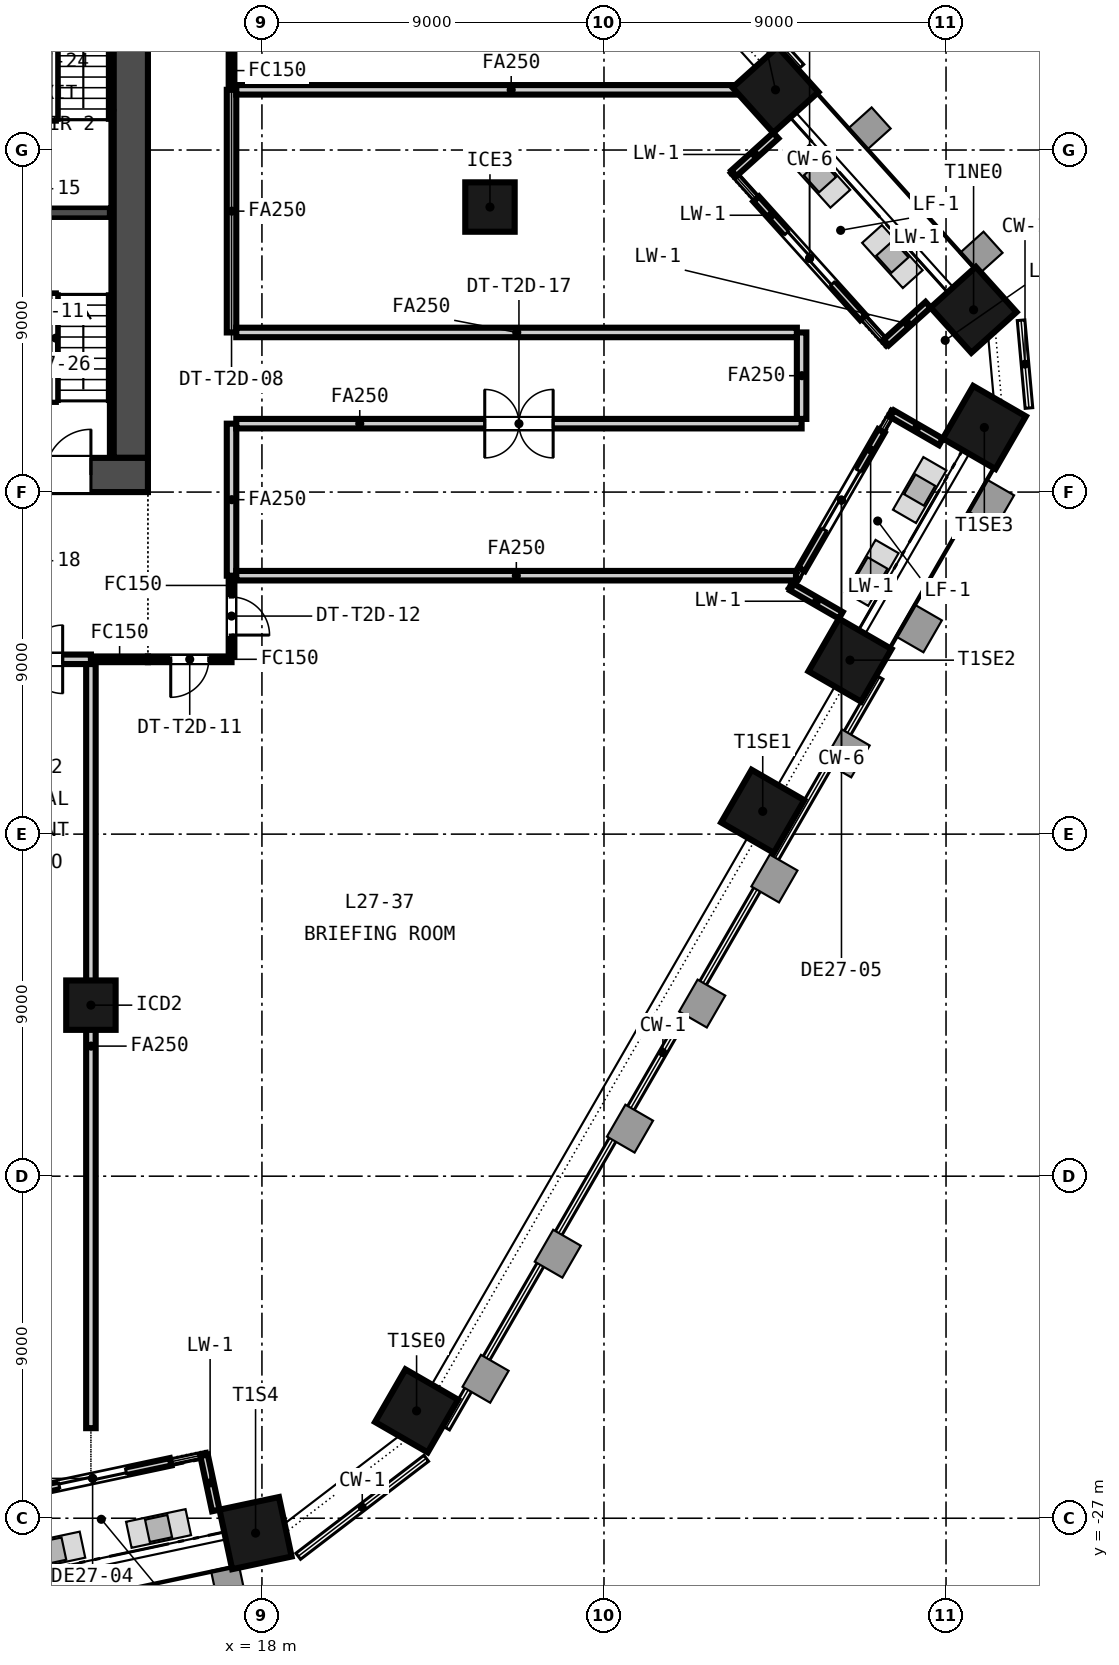
"""IFC4 building model, lengths in metres.
Left out: names, types, materials, properties, quantities, classifications, styles, units other than length and angle.
Written with IfcOpenShell. Run it as: python <this file> out.ifc"""

import sys

from ifc_helpers import new_model, si_unit, direction, frame, frame_2d, origin, origin_2d, place, context, subcontext, project, spatial, rectangle, extrude, element, fill, save


model = new_model("IFC4")
c1 = context("Model", 3, precision=1e-05, world=origin(), true_north=direction((0.0, 1.0)))
c2 = subcontext(c1, "Body", "Model", "MODEL_VIEW")
j1 = project(units=[si_unit("LENGTHUNIT", "METRE"), si_unit("PLANEANGLEUNIT", "RADIAN")], contexts=[c1])
p1 = place(None, origin())
s1 = spatial("IfcSite", under=j1, at=p1, CompositionType="ELEMENT")
p2 = place(p1, origin())
s2 = spatial("IfcBuilding", under=s1, at=p2, CompositionType="ELEMENT")
p3 = place(p2, frame((0.0, 0.0, 113.5)))
s3 = spatial("IfcBuildingStorey", under=s2, at=p3, CompositionType="ELEMENT", Elevation=113.5)
p4 = place(p3, frame((-15.0, 0.45, -0.15), z_axis=(0.0, 0.0, 1.0), x_axis=(1.0, 0.0, 0.0)))
e1 = element("IfcWall", 1, at=p4, inside=s3, PredefinedType="SOLIDWALL", context=c2, shape_type="SweptSolid", body=[
    extrude(rectangle(XDim=30.0, YDim=0.9, at=frame_2d((15.0, 0.0))), origin(), (0.0, 0.0, 1.0), 3.5),
])
p5 = place(p4, frame((5.8, 0.0, 0.15)))
e2 = element("IfcOpeningElement", 2, at=p5, cuts=e1, PredefinedType="OPENING", context=c2, shape_type="SweptSolid", body=[
    extrude(rectangle(XDim=2.4, YDim=2.4, at=frame_2d((1.2, 1.2))), frame((0.0, 0.46, 0.0), z_axis=(0.0, -1.0, 0.0), x_axis=(1.0, 0.0, 0.0)), (0.0, 0.0, 1.0), 0.92),
])
p6 = place(p4, frame((13.8, 0.0, 0.15)))
e3 = element("IfcOpeningElement", 3, at=p6, cuts=e1, PredefinedType="OPENING", context=c2, shape_type="SweptSolid", body=[
    extrude(rectangle(XDim=2.4, YDim=2.4, at=frame_2d((1.2, 1.2))), frame((0.0, 0.46, 0.0), z_axis=(0.0, -1.0, 0.0), x_axis=(1.0, 0.0, 0.0)), (0.0, 0.0, 1.0), 0.92),
])
p7 = place(p4, frame((21.8, 0.0, 0.15)))
e4 = element("IfcOpeningElement", 4, at=p7, cuts=e1, PredefinedType="OPENING", context=c2, shape_type="SweptSolid", body=[
    extrude(rectangle(XDim=2.4, YDim=2.4, at=frame_2d((1.2, 1.2))), frame((0.0, 0.46, 0.0), z_axis=(0.0, -1.0, 0.0), x_axis=(1.0, 0.0, 0.0)), (0.0, 0.0, 1.0), 0.92),
])
p8 = place(p4, frame((1.5, 0.0, 0.15)))
e5 = element("IfcOpeningElement", 5, at=p8, cuts=e1, PredefinedType="OPENING", context=c2, shape_type="SweptSolid", body=[
    extrude(rectangle(XDim=1.2, YDim=2.1, at=frame_2d((0.6, 1.05))), frame((0.0, 0.46, 0.0), z_axis=(0.0, -1.0, 0.0), x_axis=(1.0, 0.0, 0.0)), (0.0, 0.0, 1.0), 0.92),
])
p9 = place(p4, frame((27.3, 0.0, 0.15)))
e6 = element("IfcOpeningElement", 6, at=p9, cuts=e1, PredefinedType="OPENING", context=c2, shape_type="SweptSolid", body=[
    extrude(rectangle(XDim=1.2, YDim=2.1, at=frame_2d((0.6, 1.05))), frame((0.0, 0.46, 0.0), z_axis=(0.0, -1.0, 0.0), x_axis=(1.0, 0.0, 0.0)), (0.0, 0.0, 1.0), 0.92),
])
p10 = place(p3, frame((14.55, 0.9, -0.15), z_axis=(0.0, 0.0, 1.0), x_axis=(0.0, 1.0, 0.0)))
e7 = element("IfcWall", 7, at=p10, inside=s3, PredefinedType="SOLIDWALL", context=c2, shape_type="SweptSolid", body=[
    extrude(rectangle(XDim=13.2, YDim=0.9, at=frame_2d((6.6, 0.0))), origin(), (0.0, 0.0, 1.0), 3.5),
])
for number, where, z_axis, x_axis in (
    (8, (17.832, -27.392, -0.15), (0.0, 0.0, 1.0), (0.978, 0.208, 0.0)),
    (9, (22.069, -24.175, -0.15), (0.0, 0.0, 1.0), (0.5, 0.866, 0.0)),
    (10, (31.177, -8.4, -0.15), (0.0, 0.0, 1.0), (0.5, 0.866, 0.0)),
    (11, (33.473, -4.422, -0.15), (0.0, 0.0, 1.0), (0.5, 0.866, 0.0)),
    (12, (37.008, 1.7, -0.15), (0.0, 0.0, 1.0), (0.5, 0.866, 0.0)),
    (13, (36.725, 4.795, -0.15), (0.0, 0.0, 1.0), (-0.669, 0.743, 0.0)),
    (14, (31.513, 10.584, -0.15), (0.0, 0.0, 1.0), (-0.669, 0.743, 0.0)),
):
    element("IfcColumn", number, at=place(p3, frame(where, z_axis=z_axis, x_axis=x_axis)), inside=s3, PredefinedType="COLUMN", context=c2, shape_type="SweptSolid", body=[
        extrude(rectangle(XDim=1.6, YDim=1.6, at=origin_2d()), origin(), (0.0, 0.0, 1.0), 3.5),
    ])
for number, where, z_axis, x_axis in (
    (15, (13.5, -13.5, -0.15), (0.0, 0.0, 1.0), (1.0, 0.0, 0.0)),
    (16, (24.0, 7.5, -0.15), (0.0, 0.0, 1.0), (1.0, 0.0, 0.0)),
):
    element("IfcColumn", number, at=place(p3, frame(where, z_axis=z_axis, x_axis=x_axis)), inside=s3, PredefinedType="COLUMN", context=c2, shape_type="SweptSolid", body=[
        extrude(rectangle(XDim=1.3, YDim=1.3, at=origin_2d()), origin(), (0.0, 0.0, 1.0), 3.5),
    ])
p11 = place(p3, frame((11.49, -26.388, 0.0), z_axis=(0.0, 0.0, 1.0), x_axis=(0.978146440129, 0.207917150959, 0.0)))
e17 = element("IfcWall", 17, at=p11, inside=s3, PredefinedType="SOLIDWALL", context=c2, shape_type="SweptSolid", body=[
    extrude(rectangle(XDim=4.2, YDim=0.2, at=frame_2d((2.1, 0.0))), origin(), (0.0, 0.0, 1.0), 2.591),
])
p12 = place(p11, frame((1.2, 0.0, 0.0)))
e18 = element("IfcOpeningElement", 18, at=p12, cuts=e17, PredefinedType="OPENING", context=c2, shape_type="SweptSolid", body=[
    extrude(rectangle(XDim=1.8, YDim=2.4, at=frame_2d((0.9, 1.2))), frame((0.0, 0.11, 0.0), z_axis=(0.0, -1.0, 0.0), x_axis=(1.0, 0.0, 0.0)), (0.0, 0.0, 1.0), 0.22),
])
p13 = place(p3, frame((16.785, -26.796, 0.0), z_axis=(0.0, 0.0, 1.0), x_axis=(-0.207776118874, 0.978176407621, 0.0)))
e19 = element("IfcWall", 19, at=p13, inside=s3, PredefinedType="SOLIDWALL", context=c2, shape_type="SweptSolid", body=[
    extrude(rectangle(XDim=1.484, YDim=0.2, at=frame_2d((0.742, 0.0))), origin(), (0.0, 0.0, 1.0), 2.826),
])
p14 = place(p3, frame((32.199, -2.03, 0.0), z_axis=(0.0, 0.0, 1.0), x_axis=(0.499958946799, 0.866049104564, 0.0)))
e20 = element("IfcWall", 20, at=p14, inside=s3, PredefinedType="SOLIDWALL", context=c2, shape_type="SweptSolid", body=[
    extrude(rectangle(XDim=4.2, YDim=0.2, at=frame_2d((2.1, 0.0))), origin(), (0.0, 0.0, 1.0), 2.671),
])
p15 = place(p14, frame((1.2, 0.0, 0.0)))
e21 = element("IfcOpeningElement", 21, at=p15, cuts=e20, PredefinedType="OPENING", context=c2, shape_type="SweptSolid", body=[
    extrude(rectangle(XDim=1.8, YDim=2.4, at=frame_2d((0.9, 1.2))), frame((0.0, 0.11, 0.0), z_axis=(0.0, -1.0, 0.0), x_axis=(1.0, 0.0, 0.0)), (0.0, 0.0, 1.0), 0.22),
])
for number, where, z_axis, x_axis in (
    (22, (33.23, -3.243, 0.0), (0.0, 0.0, 1.0), (-0.866, 0.5, 0.0)),
    (23, (35.865, 1.321, 0.0), (0.0, 0.0, 1.0), (-0.866, 0.5, 0.0)),
):
    element("IfcWall", number, at=place(p3, frame(where, z_axis=z_axis, x_axis=x_axis)), inside=s3, PredefinedType="SOLIDWALL", context=c2, shape_type="SweptSolid", body=[
        extrude(rectangle(XDim=1.484, YDim=0.2, at=frame_2d((0.742, 0.0))), origin(), (0.0, 0.0, 1.0), 2.9),
    ])
p16 = place(p3, frame((33.815, 4.59, 0.0), z_axis=(0.0, 0.0, 1.0), x_axis=(-0.669138140895, 0.743138041282, 0.0)))
e24 = element("IfcWall", 24, at=p16, inside=s3, PredefinedType="SOLIDWALL", context=c2, shape_type="SweptSolid", body=[
    extrude(rectangle(XDim=4.2, YDim=0.2, at=frame_2d((2.1, 0.0))), origin(), (0.0, 0.0, 1.0), 2.671),
])
p17 = place(p16, frame((1.2, 0.0, 0.0)))
e25 = element("IfcOpeningElement", 25, at=p17, cuts=e24, PredefinedType="OPENING", context=c2, shape_type="SweptSolid", body=[
    extrude(rectangle(XDim=1.8, YDim=2.4, at=frame_2d((0.9, 1.2))), frame((0.0, 0.11, 0.0), z_axis=(0.0, -1.0, 0.0), x_axis=(1.0, 0.0, 0.0)), (0.0, 0.0, 1.0), 0.22),
])
p18 = place(p3, frame((35.528, 4.929, 0.0), z_axis=(0.0, 0.0, 1.0), x_axis=(-0.743155057383, -0.669119242501, 0.0)))
e26 = element("IfcWall", 26, at=p18, inside=s3, PredefinedType="SOLIDWALL", context=c2, shape_type="SweptSolid", body=[
    extrude(rectangle(XDim=1.484, YDim=0.2, at=frame_2d((0.742, 0.0))), origin(), (0.0, 0.0, 1.0), 2.671),
])
p19 = place(p3, frame((31.521, 9.38, 0.0), z_axis=(0.0, 0.0, 1.0), x_axis=(-0.743073249722, -0.669210090739, 0.0)))
e27 = element("IfcWall", 27, at=p19, inside=s3, PredefinedType="SOLIDWALL", context=c2, shape_type="SweptSolid", body=[
    extrude(rectangle(XDim=1.484, YDim=0.2, at=frame_2d((0.742, 0.0))), origin(), (0.0, 0.0, 1.0), 2.9),
])
p20 = place(p3, frame((11.05, 7.35, 0.0), z_axis=(0.0, 0.0, 1.0), x_axis=(1.0, 0.0, 0.0)))
e28 = element("IfcWall", 28, at=p20, inside=s3, PredefinedType="SOLIDWALL", context=c2, shape_type="SweptSolid", body=[
    extrude(rectangle(XDim=2.95, YDim=0.3, at=frame_2d((1.475, 0.0))), origin(), (0.0, 0.0, 1.0), 3.35),
])
p21 = place(p3, frame((14.05, 0.9, 0.0), z_axis=(0.0, 0.0, 1.0), x_axis=(0.0, 1.0, 0.0)))
e29 = element("IfcWall", 29, at=p21, inside=s3, PredefinedType="SOLIDWALL", context=c2, shape_type="SweptSolid", body=[
    extrude(rectangle(XDim=13.2, YDim=0.1, at=frame_2d((6.6, 0.0))), origin(), (0.0, 0.0, 1.0), 3.35),
])
p22 = place(p3, frame((15.0, -4.4, 0.0), z_axis=(0.0, 0.0, 1.0), x_axis=(-1.0, 0.0, 0.0)))
e30 = element("IfcWall", 30, at=p22, inside=s3, PredefinedType="PARTITIONING", context=c2, shape_type="SweptSolid", body=[
    extrude(rectangle(XDim=1.5, YDim=0.15, at=frame_2d((0.75, 0.0))), origin(), (0.0, 0.0, 1.0), 2.591),
])
p23 = place(p3, frame((13.5, -4.4, 0.0), z_axis=(0.0, 0.0, 1.0), x_axis=(-1.0, 0.0, 0.0)))
e31 = element("IfcWall", 31, at=p23, inside=s3, PredefinedType="PARTITIONING", context=c2, shape_type="SweptSolid", body=[
    extrude(rectangle(XDim=3.287, YDim=0.25, at=frame_2d((1.644, 0.0))), origin(), (0.0, 0.0, 1.0), 2.591),
])
p24 = place(p23, frame((0.743, 0.0, 0.0)))
e32 = element("IfcOpeningElement", 32, at=p24, cuts=e31, PredefinedType="OPENING", context=c2, shape_type="SweptSolid", body=[
    extrude(rectangle(XDim=1.8, YDim=2.1, at=frame_2d((0.9, 1.05))), frame((0.0, 0.135, 0.0), z_axis=(0.0, -1.0, 0.0), x_axis=(1.0, 0.0, 0.0)), (0.0, 0.0, 1.0), 0.27),
])
p25 = place(p3, frame((17.2, 13.709, 0.0), z_axis=(0.0, 0.0, 1.0), x_axis=(0.0, -1.0, 0.0)))
e33 = element("IfcWall", 33, at=p25, inside=s3, PredefinedType="PARTITIONING", context=c2, shape_type="SweptSolid", body=[
    extrude(rectangle(XDim=3.125, YDim=0.15, at=frame_2d((1.562, 0.0))), origin(), (0.0, 0.0, 1.0), 2.591),
])
p26 = place(p25, frame((1.062, 0.0, 0.0)))
e34 = element("IfcOpeningElement", 34, at=p26, cuts=e33, PredefinedType="OPENING", context=c2, shape_type="SweptSolid", body=[
    extrude(rectangle(XDim=1.0, YDim=2.1, at=frame_2d((0.5, 1.05))), frame((0.0, 0.085, 0.0), z_axis=(0.0, -1.0, 0.0), x_axis=(1.0, 0.0, 0.0)), (0.0, 0.0, 1.0), 0.17),
])
p27 = place(p3, frame((17.2, -4.4, 0.0), z_axis=(0.0, 0.0, 1.0), x_axis=(-1.0, 0.0, 0.0)))
e35 = element("IfcWall", 35, at=p27, inside=s3, PredefinedType="PARTITIONING", context=c2, shape_type="SweptSolid", body=[
    extrude(rectangle(XDim=2.2, YDim=0.15, at=frame_2d((1.1, 0.0))), origin(), (0.0, 0.0, 1.0), 2.591),
])
p28 = place(p27, frame((0.6, 0.0, 0.0)))
e36 = element("IfcOpeningElement", 36, at=p28, cuts=e35, PredefinedType="OPENING", context=c2, shape_type="SweptSolid", body=[
    extrude(rectangle(XDim=1.0, YDim=2.1, at=frame_2d((0.5, 1.05))), frame((0.0, 0.085, 0.0), z_axis=(0.0, -1.0, 0.0), x_axis=(1.0, 0.0, 0.0)), (0.0, 0.0, 1.0), 0.17),
])
p29 = place(p3, frame((17.2, -2.2, 0.0), z_axis=(0.0, 0.0, 1.0), x_axis=(0.0, -1.0, 0.0)))
e37 = element("IfcWall", 37, at=p29, inside=s3, PredefinedType="PARTITIONING", context=c2, shape_type="SweptSolid", body=[
    extrude(rectangle(XDim=2.125, YDim=0.15, at=frame_2d((1.062, 0.0))), origin(), (0.0, 0.0, 1.0), 2.591),
])
p30 = place(p29, frame((0.562, 0.0, 0.0)))
e38 = element("IfcOpeningElement", 38, at=p30, cuts=e37, PredefinedType="OPENING", context=c2, shape_type="SweptSolid", body=[
    extrude(rectangle(XDim=1.0, YDim=2.1, at=frame_2d((0.5, 1.05))), frame((0.0, 0.085, 0.0), z_axis=(0.0, -1.0, 0.0), x_axis=(1.0, 0.0, 0.0)), (0.0, 0.0, 1.0), 0.17),
])
p31 = place(p3, frame((17.2, 1.8, 0.0), z_axis=(0.0, 0.0, 1.0), x_axis=(0.0, -1.0, 0.0)))
e39 = element("IfcWall", 39, at=p31, inside=s3, PredefinedType="PARTITIONING", context=c2, shape_type="SweptSolid", body=[
    extrude(rectangle(XDim=4.0, YDim=0.25, at=frame_2d((2.0, 0.0))), origin(), (0.0, 0.0, 1.0), 2.591),
])
p32 = place(p3, frame((32.2, 1.8, 0.0), z_axis=(0.0, 0.0, 1.0), x_axis=(-1.0, 0.0, 0.0)))
e40 = element("IfcWall", 40, at=p32, inside=s3, PredefinedType="PARTITIONING", context=c2, shape_type="SweptSolid", body=[
    extrude(rectangle(XDim=14.875, YDim=0.25, at=frame_2d((7.438, 0.0))), origin(), (0.0, 0.0, 1.0), 2.591),
])
p33 = place(p32, frame((6.538, 0.0, 0.0)))
e41 = element("IfcOpeningElement", 41, at=p33, cuts=e40, PredefinedType="OPENING", context=c2, shape_type="SweptSolid", body=[
    extrude(rectangle(XDim=1.8, YDim=2.1, at=frame_2d((0.9, 1.05))), frame((0.0, 0.135, 0.0), z_axis=(0.0, -1.0, 0.0), x_axis=(1.0, 0.0, 0.0)), (0.0, 0.0, 1.0), 0.27),
])
p34 = place(p3, frame((32.2, 4.2, 0.0), z_axis=(0.0, 0.0, 1.0), x_axis=(0.0, -1.0, 0.0)))
e42 = element("IfcWall", 42, at=p34, inside=s3, PredefinedType="PARTITIONING", context=c2, shape_type="SweptSolid", body=[
    extrude(rectangle(XDim=2.275, YDim=0.25, at=frame_2d((1.137, 0.0))), origin(), (0.0, 0.0, 1.0), 2.591),
])
p35 = place(p3, frame((17.2, 10.584, 0.0), z_axis=(0.0, 0.0, 1.0), x_axis=(0.0, -1.0, 0.0)))
e43 = element("IfcWall", 43, at=p35, inside=s3, PredefinedType="PARTITIONING", context=c2, shape_type="SweptSolid", body=[
    extrude(rectangle(XDim=6.384, YDim=0.25, at=frame_2d((3.192, 0.0))), origin(), (0.0, 0.0, 1.0), 2.591),
])
p36 = place(p3, frame((17.325, 10.584, 0.0), z_axis=(0.0, 0.0, 1.0), x_axis=(1.0, 0.0, 0.0)))
e44 = element("IfcWall", 44, at=p36, inside=s3, PredefinedType="PARTITIONING", context=c2, shape_type="SweptSolid", body=[
    extrude(rectangle(XDim=14.457, YDim=0.25, at=frame_2d((7.229, 0.0))), origin(), (0.0, 0.0, 1.0), 2.591),
])
p37 = place(p3, frame((17.325, 4.2, 0.0), z_axis=(0.0, 0.0, 1.0), x_axis=(1.0, 0.0, 0.0)))
e45 = element("IfcWall", 45, at=p37, inside=s3, PredefinedType="PARTITIONING", context=c2, shape_type="SweptSolid", body=[
    extrude(rectangle(XDim=14.75, YDim=0.25, at=frame_2d((7.375, 0.0))), origin(), (0.0, 0.0, 1.0), 2.591),
])
p38 = place(p3, frame((17.325, -2.2, 0.0), z_axis=(0.0, 0.0, 1.0), x_axis=(1.0, 0.0, 0.0)))
e46 = element("IfcWall", 46, at=p38, inside=s3, PredefinedType="PARTITIONING", context=c2, shape_type="SweptSolid", body=[
    extrude(rectangle(XDim=14.727, YDim=0.25, at=frame_2d((7.364, 0.0))), origin(), (0.0, 0.0, 1.0), 2.591),
])
p39 = place(p3, frame((13.5, -24.63, 0.0), z_axis=(0.0, 0.0, 1.0), x_axis=(0.0, 1.0, 0.0)))
e47 = element("IfcWall", 47, at=p39, inside=s3, PredefinedType="PARTITIONING", context=c2, shape_type="SweptSolid", body=[
    extrude(rectangle(XDim=20.105, YDim=0.25, at=frame_2d((10.053, 0.0))), origin(), (0.0, 0.0, 1.0), 2.591),
])
p40 = place(p12, origin())
e48 = element("IfcDoor", 48, at=p40, inside=s3, OperationType="SINGLE_SWING_LEFT", PredefinedType="DOOR", context=c2, shape_type="SweptSolid", body=[
    extrude(rectangle(XDim=1.8, YDim=2.4, at=frame_2d((0.9, 1.2))), frame((0.0, 0.025, 0.0), z_axis=(0.0, -1.0, 0.0), x_axis=(1.0, 0.0, 0.0)), (0.0, 0.0, 1.0), 0.05),
])
fill(e18, e48)
p41 = place(p15, origin())
e49 = element("IfcDoor", 49, at=p41, inside=s3, OperationType="SINGLE_SWING_LEFT", PredefinedType="DOOR", context=c2, shape_type="SweptSolid", body=[
    extrude(rectangle(XDim=1.8, YDim=2.4, at=frame_2d((0.9, 1.2))), frame((0.0, 0.025, 0.0), z_axis=(0.0, -1.0, 0.0), x_axis=(1.0, 0.0, 0.0)), (0.0, 0.0, 1.0), 0.05),
])
fill(e21, e49)
p42 = place(p17, origin())
e50 = element("IfcDoor", 50, at=p42, inside=s3, OperationType="SINGLE_SWING_LEFT", PredefinedType="DOOR", context=c2, shape_type="SweptSolid", body=[
    extrude(rectangle(XDim=1.8, YDim=2.4, at=frame_2d((0.9, 1.2))), frame((0.0, 0.025, 0.0), z_axis=(0.0, -1.0, 0.0), x_axis=(1.0, 0.0, 0.0)), (0.0, 0.0, 1.0), 0.05),
])
fill(e25, e50)
p43 = place(p9, origin())
e51 = element("IfcDoor", 51, at=p43, inside=s3, OperationType="SINGLE_SWING_RIGHT", PredefinedType="DOOR", context=c2, shape_type="SweptSolid", body=[
    extrude(rectangle(XDim=1.2, YDim=2.1, at=frame_2d((0.6, 1.05))), frame((0.0, 0.025, 0.0), z_axis=(0.0, -1.0, 0.0), x_axis=(1.0, 0.0, 0.0)), (0.0, 0.0, 1.0), 0.05),
])
fill(e6, e51)
p44 = place(p28, origin())
e52 = element("IfcDoor", 52, at=p44, inside=s3, OperationType="SINGLE_SWING_RIGHT", PredefinedType="DOOR", context=c2, shape_type="SweptSolid", body=[
    extrude(rectangle(XDim=1.0, YDim=2.1, at=frame_2d((0.5, 1.05))), frame((0.0, 0.025, 0.0), z_axis=(0.0, -1.0, 0.0), x_axis=(1.0, 0.0, 0.0)), (0.0, 0.0, 1.0), 0.05),
])
fill(e36, e52)
p45 = place(p30, origin())
e53 = element("IfcDoor", 53, at=p45, inside=s3, OperationType="SINGLE_SWING_RIGHT", PredefinedType="DOOR", context=c2, shape_type="SweptSolid", body=[
    extrude(rectangle(XDim=1.0, YDim=2.1, at=frame_2d((0.5, 1.05))), frame((0.0, 0.025, 0.0), z_axis=(0.0, -1.0, 0.0), x_axis=(1.0, 0.0, 0.0)), (0.0, 0.0, 1.0), 0.05),
])
fill(e38, e53)
p46 = place(p33, origin())
e54 = element("IfcDoor", 54, at=p46, inside=s3, OperationType="DOUBLE_DOOR_DOUBLE_SWING", PredefinedType="DOOR", context=c2, shape_type="SweptSolid", body=[
    extrude(rectangle(XDim=1.8, YDim=2.1, at=frame_2d((0.9, 1.05))), frame((0.0, 0.025, 0.0), z_axis=(0.0, -1.0, 0.0), x_axis=(1.0, 0.0, 0.0)), (0.0, 0.0, 1.0), 0.05),
])
fill(e41, e54)
p47 = place(p24, origin())
e55 = element("IfcDoor", 55, at=p47, inside=s3, OperationType="DOUBLE_DOOR_DOUBLE_SWING", PredefinedType="DOOR", context=c2, shape_type="SweptSolid", body=[
    extrude(rectangle(XDim=1.8, YDim=2.1, at=frame_2d((0.9, 1.05))), frame((0.0, 0.025, 0.0), z_axis=(0.0, -1.0, 0.0), x_axis=(1.0, 0.0, 0.0)), (0.0, 0.0, 1.0), 0.05),
])
fill(e32, e55)
save(model, sys.argv[1])
